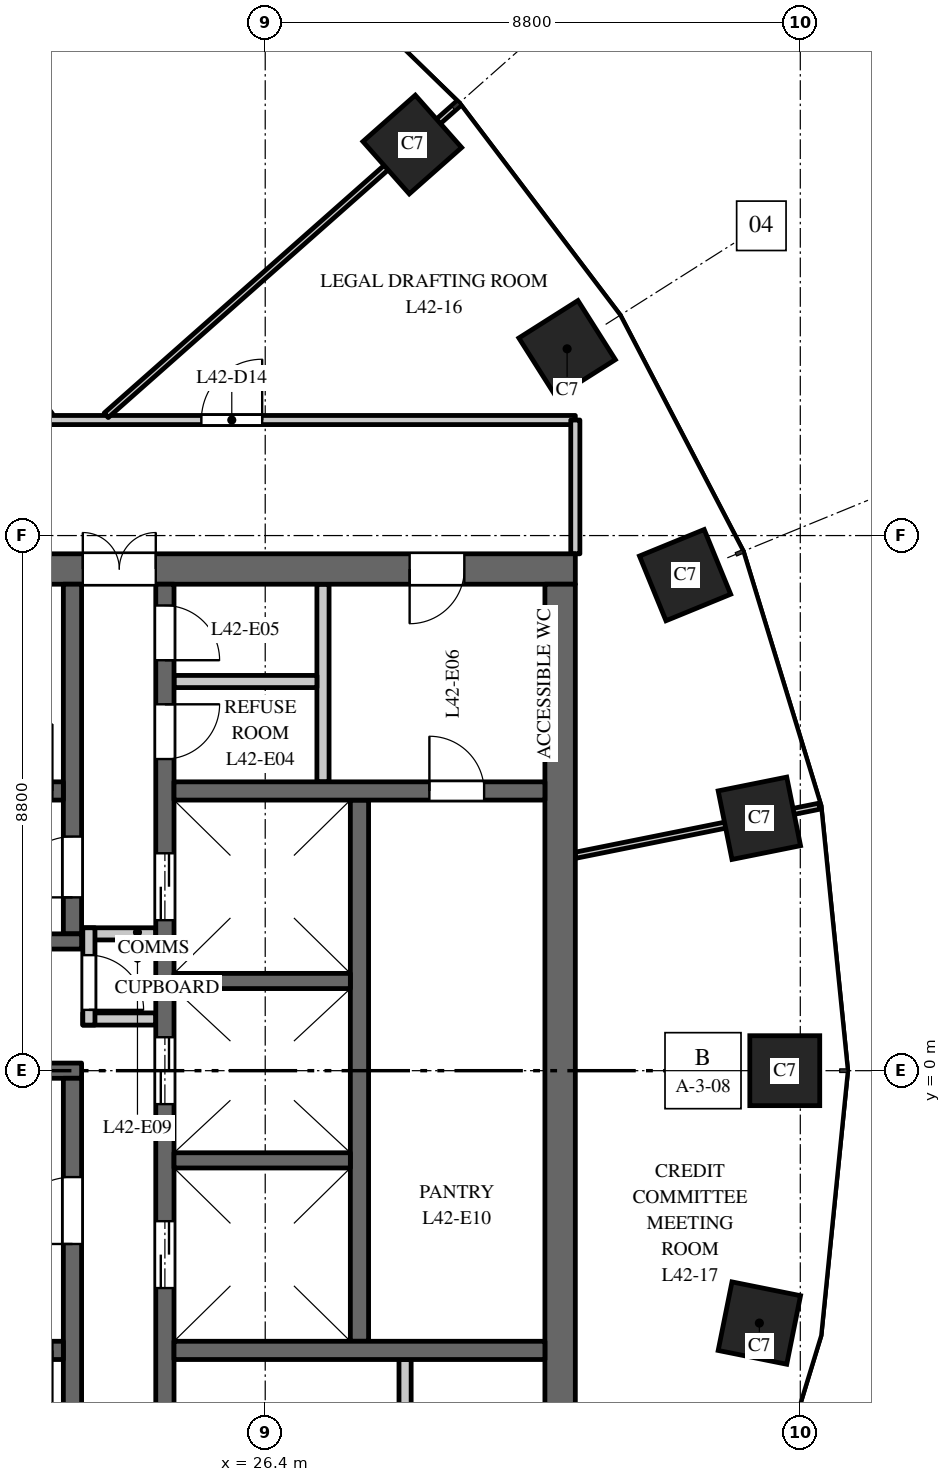
"""IFC4 building model, lengths in metres.
Left out: names, types, materials, properties, quantities, classifications, styles, units other than length and angle.
Written with IfcOpenShell. Run it as: python <this file> out.ifc"""

import sys

from ifc_helpers import new_model, si_unit, direction, frame, frame_2d, origin, origin_2d, place, context, subcontext, project, spatial, rectangle, extrude, element, fill, save


model = new_model("IFC4")
c1 = context("Model", 3, precision=1e-05, world=origin(), true_north=direction((0.0, 1.0)))
c2 = subcontext(c1, "Body", "Model", "MODEL_VIEW")
j1 = project(units=[si_unit("LENGTHUNIT", "METRE"), si_unit("PLANEANGLEUNIT", "RADIAN")], contexts=[c1])
p1 = place(None, origin())
s1 = spatial("IfcSite", under=j1, at=p1, CompositionType="ELEMENT")
p2 = place(p1, origin())
s2 = spatial("IfcBuilding", under=s1, at=p2, CompositionType="ELEMENT")
p3 = place(p2, frame((0.0, 0.0, 182.0)))
s3 = spatial("IfcBuildingStorey", under=s2, at=p3, CompositionType="ELEMENT", Elevation=182.0)
for number, where, z_axis, x_axis in (
    (1, (34.945, 0.0, 0.0), (0.0, 0.0, 1.0), (0.0, 1.0, 0.0)),
    (2, (34.527, 4.151, 0.0), (0.0, 0.0, 1.0), (-0.197, 0.98, 0.0)),
    (3, (33.305, 8.149, 0.0), (0.0, 0.0, 1.0), (-0.379, 0.925, 0.0)),
    (4, (31.365, 11.871, 0.0), (0.0, 0.0, 1.0), (-0.535, 0.845, 0.0)),
    (5, (28.819, 15.23, 0.0), (0.0, 0.0, 1.0), (-0.663, 0.749, 0.0)),
    (6, (34.527, -4.151, 0.0), (0.0, 0.0, 1.0), (0.197, 0.98, 0.0)),
):
    element("IfcColumn", number, at=place(p3, frame(where, z_axis=z_axis, x_axis=x_axis)), inside=s3, PredefinedType="COLUMN", context=c2, shape_type="SweptSolid", body=[
        extrude(rectangle(XDim=1.15, YDim=1.15, at=origin_2d()), origin(), (0.0, 0.0, 1.0), 4.0),
    ])
p4 = place(p3, frame((16.5, 8.25, 0.0), z_axis=(0.0, 0.0, 1.0), x_axis=(1.0, 0.0, 0.0)))
e7 = element("IfcWall", 7, at=p4, inside=s3, PredefinedType="SHEAR", context=c2, shape_type="SweptSolid", body=[
    extrude(rectangle(XDim=15.0, YDim=0.5, at=frame_2d((7.5, 0.0))), origin(), (0.0, 0.0, 1.0), 3.7),
])
p5 = place(p4, frame((6.9, 0.0, 0.0)))
e8 = element("IfcOpeningElement", 8, at=p5, cuts=e7, PredefinedType="OPENING", context=c2, shape_type="SweptSolid", body=[
    extrude(rectangle(XDim=1.2, YDim=2.1, at=frame_2d((0.6, 1.05))), frame((0.0, 0.26, 0.0), z_axis=(0.0, -1.0, 0.0), x_axis=(1.0, 0.0, 0.0)), (0.0, 0.0, 1.0), 0.52),
])
p6 = place(p4, frame((12.275, 0.0, 0.0)))
e9 = element("IfcOpeningElement", 9, at=p6, cuts=e7, PredefinedType="OPENING", context=c2, shape_type="SweptSolid", body=[
    extrude(rectangle(XDim=0.9, YDim=2.1, at=frame_2d((0.45, 1.05))), frame((0.0, 0.26, 0.0), z_axis=(0.0, -1.0, 0.0), x_axis=(1.0, 0.0, 0.0)), (0.0, 0.0, 1.0), 0.52),
])
p7 = place(p3, frame((27.95, -4.45, 0.0), z_axis=(0.0, 0.0, 1.0), x_axis=(0.0, 1.0, 0.0)))
e10 = element("IfcWall", 10, at=p7, inside=s3, PredefinedType="SHEAR", context=c2, shape_type="SweptSolid", body=[
    extrude(rectangle(XDim=8.9, YDim=0.3, at=frame_2d((4.45, 0.0))), origin(), (0.0, 0.0, 1.0), 3.7),
])
p8 = place(p3, frame((24.75, -8.0, 0.0), z_axis=(0.0, 0.0, 1.0), x_axis=(0.0, 1.0, 0.0)))
e11 = element("IfcWall", 11, at=p8, inside=s3, PredefinedType="SHEAR", context=c2, shape_type="SweptSolid", body=[
    extrude(rectangle(XDim=16.0, YDim=0.3, at=frame_2d((8.0, 0.0))), origin(), (0.0, 0.0, 1.0), 3.7),
])
p9 = place(p8, frame((4.425, 0.0, 0.0)))
e12 = element("IfcOpeningElement", 12, at=p9, cuts=e11, PredefinedType="OPENING", context=c2, shape_type="SweptSolid", body=[
    extrude(rectangle(XDim=1.1, YDim=2.1, at=frame_2d((0.55, 1.05))), frame((0.0, 0.16, 0.0), z_axis=(0.0, -1.0, 0.0), x_axis=(1.0, 0.0, 0.0)), (0.0, 0.0, 1.0), 0.32),
])
p10 = place(p8, frame((7.45, 0.0, 0.0)))
e13 = element("IfcOpeningElement", 13, at=p10, cuts=e11, PredefinedType="OPENING", context=c2, shape_type="SweptSolid", body=[
    extrude(rectangle(XDim=1.1, YDim=2.1, at=frame_2d((0.55, 1.05))), frame((0.0, 0.16, 0.0), z_axis=(0.0, -1.0, 0.0), x_axis=(1.0, 0.0, 0.0)), (0.0, 0.0, 1.0), 0.32),
])
p11 = place(p8, frame((10.475, 0.0, 0.0)))
e14 = element("IfcOpeningElement", 14, at=p11, cuts=e11, PredefinedType="OPENING", context=c2, shape_type="SweptSolid", body=[
    extrude(rectangle(XDim=1.1, YDim=2.1, at=frame_2d((0.55, 1.05))), frame((0.0, 0.16, 0.0), z_axis=(0.0, -1.0, 0.0), x_axis=(1.0, 0.0, 0.0)), (0.0, 0.0, 1.0), 0.32),
])
p12 = place(p8, frame((13.125, 0.0, 0.0)))
e15 = element("IfcOpeningElement", 15, at=p12, cuts=e11, PredefinedType="OPENING", context=c2, shape_type="SweptSolid", body=[
    extrude(rectangle(XDim=0.9, YDim=2.1, at=frame_2d((0.45, 1.05))), frame((0.0, 0.16, 0.0), z_axis=(0.0, -1.0, 0.0), x_axis=(1.0, 0.0, 0.0)), (0.0, 0.0, 1.0), 0.32),
])
p13 = place(p8, frame((14.75, 0.0, 0.0)))
e16 = element("IfcOpeningElement", 16, at=p13, cuts=e11, PredefinedType="OPENING", context=c2, shape_type="SweptSolid", body=[
    extrude(rectangle(XDim=0.9, YDim=2.1, at=frame_2d((0.45, 1.05))), frame((0.0, 0.16, 0.0), z_axis=(0.0, -1.0, 0.0), x_axis=(1.0, 0.0, 0.0)), (0.0, 0.0, 1.0), 0.32),
])
p14 = place(p8, frame((1.35, 0.0, 0.0)))
e17 = element("IfcOpeningElement", 17, at=p14, cuts=e11, PredefinedType="OPENING", context=c2, shape_type="SweptSolid", body=[
    extrude(rectangle(XDim=0.9, YDim=2.1, at=frame_2d((0.45, 1.05))), frame((0.0, 0.16, 0.0), z_axis=(0.0, -1.0, 0.0), x_axis=(1.0, 0.0, 0.0)), (0.0, 0.0, 1.0), 0.32),
])
p15 = place(p3, frame((20.1, 0.0, 0.0), z_axis=(0.0, 0.0, 1.0), x_axis=(1.0, 0.0, 0.0)))
e18 = element("IfcWall", 18, at=p15, inside=s3, PredefinedType="SHEAR", context=c2, shape_type="SweptSolid", body=[
    extrude(rectangle(XDim=3.28, YDim=0.25, at=frame_2d((1.64, 0.0))), origin(), (0.0, 0.0, 1.0), 3.7),
])
for number, where, z_axis, x_axis in (
    (19, (23.4, 0.85, 0.0), (0.0, 0.0, 1.0), (1.0, 0.0, 0.0)),
    (20, (23.4, 2.25, 0.0), (0.0, 0.0, 1.0), (1.0, 0.0, 0.0)),
):
    element("IfcWall", number, at=place(p3, frame(where, z_axis=z_axis, x_axis=x_axis)), inside=s3, PredefinedType="PARTITIONING", context=c2, shape_type="SweptSolid", body=[
        extrude(rectangle(XDim=1.2, YDim=0.2, at=frame_2d((0.6, 0.0))), origin(), (0.0, 0.0, 1.0), 3.7),
    ])
p16 = place(p3, frame((23.5, 0.75, 0.0), z_axis=(0.0, 0.0, 1.0), x_axis=(0.0, 1.0, 0.0)))
e21 = element("IfcWall", 21, at=p16, inside=s3, PredefinedType="PARTITIONING", context=c2, shape_type="SweptSolid", body=[
    extrude(rectangle(XDim=1.6, YDim=0.2, at=frame_2d((0.8, 0.0))), origin(), (0.0, 0.0, 1.0), 3.7),
])
p17 = place(p16, frame((0.25, 0.0, 0.0)))
e22 = element("IfcOpeningElement", 22, at=p17, cuts=e21, PredefinedType="OPENING", context=c2, shape_type="SweptSolid", body=[
    extrude(rectangle(XDim=0.9, YDim=2.1, at=frame_2d((0.45, 1.05))), frame((0.0, 0.11, 0.0), z_axis=(0.0, -1.0, 0.0), x_axis=(1.0, 0.0, 0.0)), (0.0, 0.0, 1.0), 0.22),
])
p18 = place(p3, frame((31.25, -8.0, 0.0), z_axis=(0.0, 0.0, 1.0), x_axis=(0.0, 1.0, 0.0)))
e23 = element("IfcWall", 23, at=p18, inside=s3, PredefinedType="SHEAR", context=c2, shape_type="SweptSolid", body=[
    extrude(rectangle(XDim=16.0, YDim=0.5, at=frame_2d((8.0, 0.0))), origin(), (0.0, 0.0, 1.0), 3.7),
])
p19 = place(p3, frame((24.9, 4.6, 0.0), z_axis=(0.0, 0.0, 1.0), x_axis=(1.0, 0.0, 0.0)))
e24 = element("IfcWall", 24, at=p19, inside=s3, PredefinedType="SHEAR", context=c2, shape_type="SweptSolid", body=[
    extrude(rectangle(XDim=6.1, YDim=0.3, at=frame_2d((3.05, 0.0))), origin(), (0.0, 0.0, 1.0), 3.7),
])
p20 = place(p19, frame((4.2, 0.0, 0.0)))
e25 = element("IfcOpeningElement", 25, at=p20, cuts=e24, PredefinedType="OPENING", context=c2, shape_type="SweptSolid", body=[
    extrude(rectangle(XDim=0.9, YDim=2.1, at=frame_2d((0.45, 1.05))), frame((0.0, 0.16, 0.0), z_axis=(0.0, -1.0, 0.0), x_axis=(1.0, 0.0, 0.0)), (0.0, 0.0, 1.0), 0.32),
])
for number, where, z_axis, x_axis in (
    (26, (27.35, 4.75, 0.0), (0.0, 0.0, 1.0), (0.0, 1.0, 0.0)),
    (27, (28.7, -8.0, 0.0), (0.0, 0.0, 1.0), (0.0, 1.0, 0.0)),
):
    element("IfcWall", number, at=place(p3, frame(where, z_axis=z_axis, x_axis=x_axis)), inside=s3, PredefinedType="PARTITIONING", context=c2, shape_type="SweptSolid", body=[
        extrude(rectangle(XDim=3.25, YDim=0.2, at=frame_2d((1.625, 0.0))), origin(), (0.0, 0.0, 1.0), 3.7),
    ])
p21 = place(p3, frame((24.9, 6.4, 0.0), z_axis=(0.0, 0.0, 1.0), x_axis=(1.0, 0.0, 0.0)))
e28 = element("IfcWall", 28, at=p21, inside=s3, PredefinedType="PARTITIONING", context=c2, shape_type="SweptSolid", body=[
    extrude(rectangle(XDim=2.35, YDim=0.2, at=frame_2d((1.175, 0.0))), origin(), (0.0, 0.0, 1.0), 3.7),
])
p22 = place(p3, frame((24.9, -4.6, 0.0), z_axis=(0.0, 0.0, 1.0), x_axis=(1.0, 0.0, 0.0)))
e29 = element("IfcWall", 29, at=p22, inside=s3, PredefinedType="SHEAR", context=c2, shape_type="SweptSolid", body=[
    extrude(rectangle(XDim=6.1, YDim=0.3, at=frame_2d((3.05, 0.0))), origin(), (0.0, 0.0, 1.0), 3.7),
])
for number, where, z_axis, x_axis in (
    (30, (24.9, -1.475, 0.0), (0.0, 0.0, 1.0), (1.0, 0.0, 0.0)),
    (31, (24.9, 1.475, 0.0), (0.0, 0.0, 1.0), (1.0, 0.0, 0.0)),
):
    element("IfcWall", number, at=place(p3, frame(where, z_axis=z_axis, x_axis=x_axis)), inside=s3, PredefinedType="SHEAR", context=c2, shape_type="SweptSolid", body=[
        extrude(rectangle(XDim=2.9, YDim=0.25, at=frame_2d((1.45, 0.0))), origin(), (0.0, 0.0, 1.0), 3.7),
    ])
p23 = place(p3, frame((23.23, 2.25, 0.0), z_axis=(0.0, 0.0, 1.0), x_axis=(0.0, 1.0, 0.0)))
e32 = element("IfcWall", 32, at=p23, inside=s3, PredefinedType="SHEAR", context=c2, shape_type="SweptSolid", body=[
    extrude(rectangle(XDim=5.75, YDim=0.3, at=frame_2d((2.875, 0.0))), origin(), (0.0, 0.0, 1.0), 3.7),
])
p24 = place(p23, frame((0.6, 0.0, 0.0)))
e33 = element("IfcOpeningElement", 33, at=p24, cuts=e32, PredefinedType="OPENING", context=c2, shape_type="SweptSolid", body=[
    extrude(rectangle(XDim=1.0, YDim=2.1, at=frame_2d((0.5, 1.05))), frame((0.0, 0.16, 0.0), z_axis=(0.0, -1.0, 0.0), x_axis=(1.0, 0.0, 0.0)), (0.0, 0.0, 1.0), 0.32),
])
p25 = place(p3, frame((23.23, -8.0, 0.0), z_axis=(0.0, 0.0, 1.0), x_axis=(0.0, 1.0, 0.0)))
e34 = element("IfcWall", 34, at=p25, inside=s3, PredefinedType="SHEAR", context=c2, shape_type="SweptSolid", body=[
    extrude(rectangle(XDim=7.875, YDim=0.3, at=frame_2d((3.938, 0.0))), origin(), (0.0, 0.0, 1.0), 3.7),
])
p26 = place(p25, frame((5.15, 0.0, 0.0)))
e35 = element("IfcOpeningElement", 35, at=p26, cuts=e34, PredefinedType="OPENING", context=c2, shape_type="SweptSolid", body=[
    extrude(rectangle(XDim=1.1, YDim=2.1, at=frame_2d((0.55, 1.05))), frame((0.0, 0.16, 0.0), z_axis=(0.0, -1.0, 0.0), x_axis=(1.0, 0.0, 0.0)), (0.0, 0.0, 1.0), 0.32),
])
p27 = place(p3, frame((16.9, 4.6, 0.0), z_axis=(0.0, 0.0, 1.0), x_axis=(1.0, 0.0, 0.0)))
e36 = element("IfcWall", 36, at=p27, inside=s3, PredefinedType="SHEAR", context=c2, shape_type="SweptSolid", body=[
    extrude(rectangle(XDim=6.18, YDim=0.3, at=frame_2d((3.09, 0.0))), origin(), (0.0, 0.0, 1.0), 3.7),
])
p28 = place(p27, frame((4.9, 0.0, 0.0)))
e37 = element("IfcOpeningElement", 37, at=p28, cuts=e36, PredefinedType="OPENING", context=c2, shape_type="SweptSolid", body=[
    extrude(rectangle(XDim=1.1, YDim=2.1, at=frame_2d((0.55, 1.05))), frame((0.0, 0.16, 0.0), z_axis=(0.0, -1.0, 0.0), x_axis=(1.0, 0.0, 0.0)), (0.0, 0.0, 1.0), 0.32),
])
p29 = place(p3, frame((16.9, -4.6, 0.0), z_axis=(0.0, 0.0, 1.0), x_axis=(1.0, 0.0, 0.0)))
e38 = element("IfcWall", 38, at=p29, inside=s3, PredefinedType="SHEAR", context=c2, shape_type="SweptSolid", body=[
    extrude(rectangle(XDim=6.18, YDim=0.3, at=frame_2d((3.09, 0.0))), origin(), (0.0, 0.0, 1.0), 3.7),
])
p30 = place(p29, frame((4.9, 0.0, 0.0)))
e39 = element("IfcOpeningElement", 39, at=p30, cuts=e38, PredefinedType="OPENING", context=c2, shape_type="SweptSolid", body=[
    extrude(rectangle(XDim=1.1, YDim=2.1, at=frame_2d((0.55, 1.05))), frame((0.0, 0.16, 0.0), z_axis=(0.0, -1.0, 0.0), x_axis=(1.0, 0.0, 0.0)), (0.0, 0.0, 1.0), 0.32),
])
p31 = place(p3, frame((20.85, 2.125, 0.0), z_axis=(0.0, 0.0, 1.0), x_axis=(1.0, 0.0, 0.0)))
e40 = element("IfcWall", 40, at=p31, inside=s3, PredefinedType="SHEAR", context=c2, shape_type="SweptSolid", body=[
    extrude(rectangle(XDim=2.53, YDim=0.25, at=frame_2d((1.265, 0.0))), origin(), (0.0, 0.0, 1.0), 3.7),
])
p32 = place(p3, frame((16.5, 10.7, 0.0), z_axis=(0.0, 0.0, 1.0), x_axis=(1.0, 0.0, 0.0)))
e41 = element("IfcWall", 41, at=p32, inside=s3, PredefinedType="PARTITIONING", context=c2, shape_type="SweptSolid", body=[
    extrude(rectangle(XDim=15.0, YDim=0.15, at=frame_2d((7.5, 0.0))), origin(), (0.0, 0.0, 1.0), 2.75),
])
p33 = place(p32, frame((4.267, 0.0, 0.0)))
e42 = element("IfcOpeningElement", 42, at=p33, cuts=e41, PredefinedType="OPENING", context=c2, shape_type="SweptSolid", body=[
    extrude(rectangle(XDim=1.0, YDim=2.1, at=frame_2d((0.5, 1.05))), frame((0.0, 0.085, 0.0), z_axis=(0.0, -1.0, 0.0), x_axis=(1.0, 0.0, 0.0)), (0.0, 0.0, 1.0), 0.17),
])
p34 = place(p32, frame((8.85, 0.0, 0.0)))
e43 = element("IfcOpeningElement", 43, at=p34, cuts=e41, PredefinedType="OPENING", context=c2, shape_type="SweptSolid", body=[
    extrude(rectangle(XDim=1.0, YDim=2.1, at=frame_2d((0.5, 1.05))), frame((0.0, 0.085, 0.0), z_axis=(0.0, -1.0, 0.0), x_axis=(1.0, 0.0, 0.0)), (0.0, 0.0, 1.0), 0.17),
])
p35 = place(p3, frame((21.355, 12.765, 0.0), z_axis=(0.0, 0.0, 1.0), x_axis=(0.603287715996, -0.797523624558, 0.0)))
e44 = element("IfcWall", 44, at=p35, inside=s3, PredefinedType="PARTITIONING", context=c2, shape_type="SweptSolid", body=[
    extrude(rectangle(XDim=2.491, YDim=0.1, at=frame_2d((1.246, 0.0))), origin(), (0.0, 0.0, 1.0), 2.75),
])
p36 = place(p3, frame((23.785, 10.778, 0.0), z_axis=(0.0, 0.0, 1.0), x_axis=(0.748985701008, 0.662586160198, 0.0)))
e45 = element("IfcWall", 45, at=p36, inside=s3, PredefinedType="PARTITIONING", context=c2, shape_type="SweptSolid", body=[
    extrude(rectangle(XDim=7.723, YDim=0.1, at=frame_2d((3.861, 0.0))), origin(), (0.0, 0.0, 1.0), 2.75),
])
p37 = place(p3, frame((31.5, 3.542, 0.0), z_axis=(0.0, 0.0, 1.0), x_axis=(0.980357474535, 0.197228857227, 0.0)))
e46 = element("IfcWall", 46, at=p37, inside=s3, PredefinedType="PARTITIONING", context=c2, shape_type="SweptSolid", body=[
    extrude(rectangle(XDim=4.092, YDim=0.1, at=frame_2d((2.046, 0.0))), origin(), (0.0, 0.0, 1.0), 2.9),
])
p38 = place(p3, frame((31.5, 8.5, 0.0), z_axis=(0.0, 0.0, 1.0), x_axis=(0.0, 1.0, 0.0)))
e47 = element("IfcWall", 47, at=p38, inside=s3, PredefinedType="PARTITIONING", context=c2, shape_type="SweptSolid", body=[
    extrude(rectangle(XDim=2.2, YDim=0.15, at=frame_2d((1.1, 0.0))), origin(), (0.0, 0.0, 1.0), 2.9),
])
p39 = place(p9, origin())
e48 = element("IfcDoor", 48, at=p39, inside=s3, OperationType="DOUBLE_DOOR_SLIDING", PredefinedType="DOOR", context=c2, shape_type="SweptSolid", body=[
    extrude(rectangle(XDim=1.1, YDim=2.1, at=frame_2d((0.55, 1.05))), frame((0.0, 0.025, 0.0), z_axis=(0.0, -1.0, 0.0), x_axis=(1.0, 0.0, 0.0)), (0.0, 0.0, 1.0), 0.05),
])
fill(e12, e48)
p40 = place(p10, origin())
e49 = element("IfcDoor", 49, at=p40, inside=s3, OperationType="DOUBLE_DOOR_SLIDING", PredefinedType="DOOR", context=c2, shape_type="SweptSolid", body=[
    extrude(rectangle(XDim=1.1, YDim=2.1, at=frame_2d((0.55, 1.05))), frame((0.0, 0.025, 0.0), z_axis=(0.0, -1.0, 0.0), x_axis=(1.0, 0.0, 0.0)), (0.0, 0.0, 1.0), 0.05),
])
fill(e13, e49)
p41 = place(p11, origin())
e50 = element("IfcDoor", 50, at=p41, inside=s3, OperationType="DOUBLE_DOOR_SLIDING", PredefinedType="DOOR", context=c2, shape_type="SweptSolid", body=[
    extrude(rectangle(XDim=1.1, YDim=2.1, at=frame_2d((0.55, 1.05))), frame((0.0, 0.025, 0.0), z_axis=(0.0, -1.0, 0.0), x_axis=(1.0, 0.0, 0.0)), (0.0, 0.0, 1.0), 0.05),
])
fill(e14, e50)
p42 = place(p28, origin())
e51 = element("IfcDoor", 51, at=p42, inside=s3, OperationType="SINGLE_SWING_LEFT", PredefinedType="DOOR", context=c2, shape_type="SweptSolid", body=[
    extrude(rectangle(XDim=1.1, YDim=2.1, at=frame_2d((0.55, 1.05))), frame((0.0, 0.025, 0.0), z_axis=(0.0, -1.0, 0.0), x_axis=(1.0, 0.0, 0.0)), (0.0, 0.0, 1.0), 0.05),
])
fill(e37, e51)
p43 = place(p30, origin())
e52 = element("IfcDoor", 52, at=p43, inside=s3, OperationType="SINGLE_SWING_RIGHT", PredefinedType="DOOR", context=c2, shape_type="SweptSolid", body=[
    extrude(rectangle(XDim=1.1, YDim=2.1, at=frame_2d((0.55, 1.05))), frame((0.0, 0.025, 0.0), z_axis=(0.0, -1.0, 0.0), x_axis=(1.0, 0.0, 0.0)), (0.0, 0.0, 1.0), 0.05),
])
fill(e39, e52)
p44 = place(p26, origin())
e53 = element("IfcDoor", 53, at=p44, inside=s3, OperationType="SINGLE_SWING_RIGHT", PredefinedType="DOOR", context=c2, shape_type="SweptSolid", body=[
    extrude(rectangle(XDim=1.1, YDim=2.1, at=frame_2d((0.55, 1.05))), frame((0.0, 0.025, 0.0), z_axis=(0.0, -1.0, 0.0), x_axis=(1.0, 0.0, 0.0)), (0.0, 0.0, 1.0), 0.05),
])
fill(e35, e53)
p45 = place(p24, origin())
e54 = element("IfcDoor", 54, at=p45, inside=s3, OperationType="SINGLE_SWING_RIGHT", PredefinedType="DOOR", context=c2, shape_type="SweptSolid", body=[
    extrude(rectangle(XDim=1.0, YDim=2.1, at=frame_2d((0.5, 1.05))), frame((0.0, 0.025, 0.0), z_axis=(0.0, -1.0, 0.0), x_axis=(1.0, 0.0, 0.0)), (0.0, 0.0, 1.0), 0.05),
])
fill(e33, e54)
p46 = place(p5, origin())
e55 = element("IfcDoor", 55, at=p46, inside=s3, OperationType="DOUBLE_DOOR_DOUBLE_SWING", PredefinedType="DOOR", context=c2, shape_type="SweptSolid", body=[
    extrude(rectangle(XDim=1.2, YDim=2.1, at=frame_2d((0.6, 1.05))), frame((0.0, 0.025, 0.0), z_axis=(0.0, -1.0, 0.0), x_axis=(1.0, 0.0, 0.0)), (0.0, 0.0, 1.0), 0.05),
])
fill(e8, e55)
p47 = place(p12, origin())
e56 = element("IfcDoor", 56, at=p47, inside=s3, OperationType="SINGLE_SWING_RIGHT", PredefinedType="DOOR", context=c2, shape_type="SweptSolid", body=[
    extrude(rectangle(XDim=0.9, YDim=2.1, at=frame_2d((0.45, 1.05))), frame((0.0, 0.025, 0.0), z_axis=(0.0, -1.0, 0.0), x_axis=(1.0, 0.0, 0.0)), (0.0, 0.0, 1.0), 0.05),
])
fill(e15, e56)
p48 = place(p13, origin())
e57 = element("IfcDoor", 57, at=p48, inside=s3, OperationType="SINGLE_SWING_LEFT", PredefinedType="DOOR", context=c2, shape_type="SweptSolid", body=[
    extrude(rectangle(XDim=0.9, YDim=2.1, at=frame_2d((0.45, 1.05))), frame((0.0, 0.025, 0.0), z_axis=(0.0, -1.0, 0.0), x_axis=(1.0, 0.0, 0.0)), (0.0, 0.0, 1.0), 0.05),
])
fill(e16, e57)
p49 = place(p6, origin())
e58 = element("IfcDoor", 58, at=p49, inside=s3, OperationType="SINGLE_SWING_LEFT", PredefinedType="DOOR", context=c2, shape_type="SweptSolid", body=[
    extrude(rectangle(XDim=0.9, YDim=2.1, at=frame_2d((0.45, 1.05))), frame((0.0, 0.025, 0.0), z_axis=(0.0, -1.0, 0.0), x_axis=(1.0, 0.0, 0.0)), (0.0, 0.0, 1.0), 0.05),
])
fill(e9, e58)
p50 = place(p17, origin())
e59 = element("IfcDoor", 59, at=p50, inside=s3, OperationType="SINGLE_SWING_LEFT", PredefinedType="DOOR", context=c2, shape_type="SweptSolid", body=[
    extrude(rectangle(XDim=0.9, YDim=2.1, at=frame_2d((0.45, 1.05))), frame((0.0, 0.025, 0.0), z_axis=(0.0, -1.0, 0.0), x_axis=(1.0, 0.0, 0.0)), (0.0, 0.0, 1.0), 0.05),
])
fill(e22, e59)
p51 = place(p20, origin())
e60 = element("IfcDoor", 60, at=p51, inside=s3, OperationType="SINGLE_SWING_RIGHT", PredefinedType="DOOR", context=c2, shape_type="SweptSolid", body=[
    extrude(rectangle(XDim=0.9, YDim=2.1, at=frame_2d((0.45, 1.05))), frame((0.0, 0.025, 0.0), z_axis=(0.0, -1.0, 0.0), x_axis=(1.0, 0.0, 0.0)), (0.0, 0.0, 1.0), 0.05),
])
fill(e25, e60)
p52 = place(p34, origin())
e61 = element("IfcDoor", 61, at=p52, inside=s3, OperationType="SINGLE_SWING_RIGHT", PredefinedType="DOOR", context=c2, shape_type="SweptSolid", body=[
    extrude(rectangle(XDim=1.0, YDim=2.1, at=frame_2d((0.5, 1.05))), frame((0.0, 0.025, 0.0), z_axis=(0.0, -1.0, 0.0), x_axis=(1.0, 0.0, 0.0)), (0.0, 0.0, 1.0), 0.05),
])
fill(e43, e61)
save(model, sys.argv[1])
